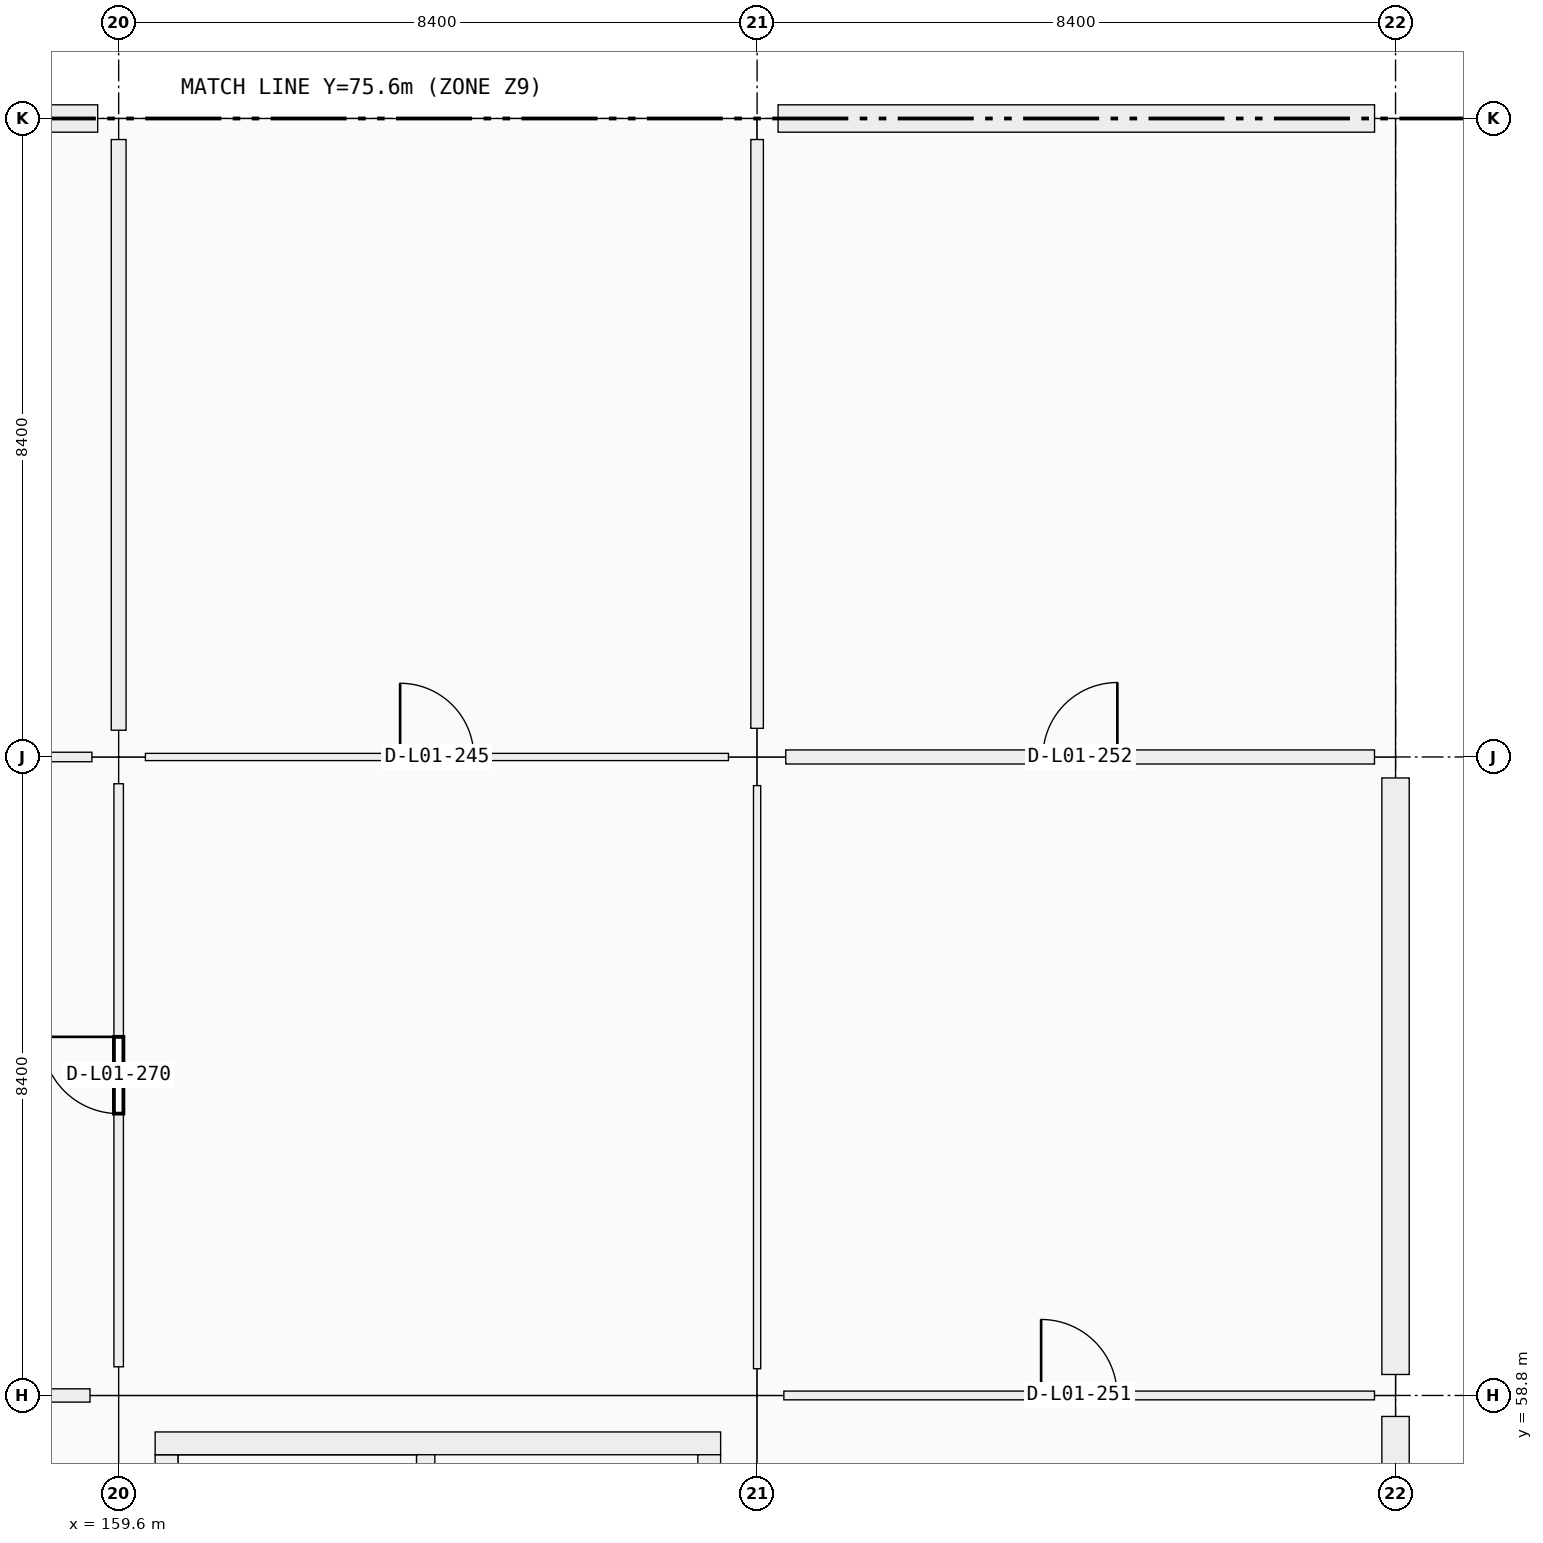
"""IFC4 building model, lengths in metres.
Left out: names, types, materials, properties, quantities, classifications, styles, units other than length and angle.
Written with IfcOpenShell. Run it as: python <this file> out.ifc"""

import sys

from ifc_helpers import new_model, si_unit, direction, frame, frame_2d, origin, origin_2d, place, context, subcontext, project, spatial, rectangle, extrude, element, fill, save


model = new_model("IFC4")
c1 = context("Model", 3, precision=1e-05, world=origin(), true_north=direction((0.0, 1.0)))
c2 = subcontext(c1, "Body", "Model", "MODEL_VIEW")
j1 = project(units=[si_unit("LENGTHUNIT", "METRE"), si_unit("PLANEANGLEUNIT", "RADIAN")], contexts=[c1])
p1 = place(None, origin())
s1 = spatial("IfcSite", under=j1, at=p1, CompositionType="ELEMENT")
p2 = place(p1, origin())
s2 = spatial("IfcBuilding", under=s1, at=p2, CompositionType="ELEMENT")
p3 = place(p2, frame((0.0, 0.0, 5.76)))
s3 = spatial("IfcBuildingStorey", under=s2, at=p3, CompositionType="ELEMENT", Elevation=5.76)
p4 = place(p3, frame((159.6, 58.8, 0.0), z_axis=(0.0, 0.0, 1.0), x_axis=(1.0, 0.0, 0.0)))
e1 = element("IfcColumn", 1, at=p4, inside=s3, PredefinedType="COLUMN", context=c2, shape_type="SweptSolid", body=[
    extrude(rectangle(XDim=0.75, YDim=0.75, at=origin_2d()), origin(), (0.0, 0.0, 1.0), 4.5),
])
p5 = place(p3, frame((159.6, 67.2, 0.0), z_axis=(0.0, 0.0, 1.0), x_axis=(1.0, 0.0, 0.0)))
e2 = element("IfcColumn", 2, at=p5, inside=s3, PredefinedType="COLUMN", context=c2, shape_type="SweptSolid", body=[
    extrude(rectangle(XDim=0.7, YDim=0.7, at=origin_2d()), origin(), (0.0, 0.0, 1.0), 4.5),
])
p6 = place(p3, frame((159.6, 75.6, 0.0), z_axis=(0.0, 0.0, 1.0), x_axis=(1.0, 0.0, 0.0)))
e3 = element("IfcColumn", 3, at=p6, inside=s3, PredefinedType="COLUMN", context=c2, shape_type="SweptSolid", body=[
    extrude(rectangle(XDim=0.55, YDim=0.55, at=origin_2d()), origin(), (0.0, 0.0, 1.0), 4.2),
])
p7 = place(p3, frame((168.0, 58.8, 0.0), z_axis=(0.0, 0.0, 1.0), x_axis=(1.0, 0.0, 0.0)))
e4 = element("IfcColumn", 4, at=p7, inside=s3, PredefinedType="COLUMN", context=c2, shape_type="SweptSolid", body=[
    extrude(rectangle(XDim=0.7, YDim=0.7, at=origin_2d()), origin(), (0.0, 0.0, 1.0), 4.5),
])
p8 = place(p3, frame((168.0, 67.2, 0.0), z_axis=(0.0, 0.0, 1.0), x_axis=(1.0, 0.0, 0.0)))
e5 = element("IfcColumn", 5, at=p8, inside=s3, PredefinedType="COLUMN", context=c2, shape_type="SweptSolid", body=[
    extrude(rectangle(XDim=0.75, YDim=0.75, at=origin_2d()), origin(), (0.0, 0.0, 1.0), 4.5),
])
for number, where, z_axis, x_axis in (
    (6, (168.0, 75.6, 0.0), (0.0, 0.0, 1.0), (1.0, 0.0, 0.0)),
    (7, (176.4, 58.8, 0.0), (0.0, 0.0, 1.0), (1.0, 0.0, 0.0)),
    (8, (176.4, 67.2, 0.0), (0.0, 0.0, 1.0), (1.0, 0.0, 0.0)),
    (9, (176.4, 75.6, 0.0), (0.0, 0.0, 1.0), (1.0, 0.0, 0.0)),
):
    element("IfcColumn", number, at=place(p3, frame(where, z_axis=z_axis, x_axis=x_axis)), inside=s3, PredefinedType="COLUMN", context=c2, shape_type="SweptSolid", body=[
        extrude(rectangle(XDim=0.55, YDim=0.55, at=origin_2d()), origin(), (0.0, 0.0, 1.0), 4.2),
    ])
p9 = place(p3, frame((151.476, 75.6, 0.0), z_axis=(0.0, 0.0, 1.0), x_axis=(1.0, 0.0, 0.0)))
e10 = element("IfcWall", 10, at=p9, inside=s3, PredefinedType="SOLIDWALL", context=c2, shape_type="SweptSolid", body=[
    extrude(rectangle(XDim=7.848, YDim=0.36, at=frame_2d((3.924, 0.0))), origin(), (0.0, 0.0, 1.0), 3.4),
])
p10 = place(p9, frame((2.474, 0.0, 0.9)))
e11 = element("IfcOpeningElement", 11, at=p10, cuts=e10, PredefinedType="OPENING", context=c2, shape_type="SweptSolid", body=[
    extrude(rectangle(XDim=2.9, YDim=1.85, at=frame_2d((1.45, 0.925))), frame((0.0, 0.18, 0.0), z_axis=(0.0, -1.0, 0.0), x_axis=(1.0, 0.0, 0.0)), (0.0, 0.0, 1.0), 0.36),
])
p11 = place(p3, frame((176.4, 58.524, 0.0), z_axis=(0.0, 0.0, 1.0), x_axis=(0.0, -1.0, 0.0)))
e12 = element("IfcWall", 12, at=p11, inside=s3, PredefinedType="SOLIDWALL", context=c2, shape_type="SweptSolid", body=[
    extrude(rectangle(XDim=7.848, YDim=0.36, at=frame_2d((3.924, 0.0))), origin(), (0.0, 0.0, 1.0), 3.4),
])
p12 = place(p11, frame((2.749, 0.0, 0.9)))
e13 = element("IfcOpeningElement", 13, at=p12, cuts=e12, PredefinedType="OPENING", context=c2, shape_type="SweptSolid", body=[
    extrude(rectangle(XDim=2.35, YDim=1.6, at=frame_2d((1.175, 0.8))), frame((0.0, 0.18, 0.0), z_axis=(0.0, -1.0, 0.0), x_axis=(1.0, 0.0, 0.0)), (0.0, 0.0, 1.0), 0.36),
])
p13 = place(p3, frame((176.4, 66.924, 0.0), z_axis=(0.0, 0.0, 1.0), x_axis=(0.0, -1.0, 0.0)))
e14 = element("IfcWall", 14, at=p13, inside=s3, PredefinedType="SOLIDWALL", context=c2, shape_type="SweptSolid", body=[
    extrude(rectangle(XDim=7.848, YDim=0.36, at=frame_2d((3.924, 0.0))), origin(), (0.0, 0.0, 1.0), 3.4),
])
p14 = place(p13, frame((2.549, 0.0, 0.9)))
e15 = element("IfcOpeningElement", 15, at=p14, cuts=e14, PredefinedType="OPENING", context=c2, shape_type="SweptSolid", body=[
    extrude(rectangle(XDim=2.75, YDim=1.6, at=frame_2d((1.375, 0.8))), frame((0.0, 0.18, 0.0), z_axis=(0.0, -1.0, 0.0), x_axis=(1.0, 0.0, 0.0)), (0.0, 0.0, 1.0), 0.36),
])
p15 = place(p3, frame((168.276, 75.6, 0.0), z_axis=(0.0, 0.0, 1.0), x_axis=(1.0, 0.0, 0.0)))
e16 = element("IfcWall", 16, at=p15, inside=s3, PredefinedType="SOLIDWALL", context=c2, shape_type="SweptSolid", body=[
    extrude(rectangle(XDim=7.848, YDim=0.36, at=frame_2d((3.924, 0.0))), origin(), (0.0, 0.0, 1.0), 3.4),
])
p16 = place(p15, frame((3.149, 0.0, 0.9)))
e17 = element("IfcOpeningElement", 17, at=p16, cuts=e16, PredefinedType="OPENING", context=c2, shape_type="SweptSolid", body=[
    extrude(rectangle(XDim=1.55, YDim=1.6, at=frame_2d((0.775, 0.8))), frame((0.0, 0.18, 0.0), z_axis=(0.0, -1.0, 0.0), x_axis=(1.0, 0.0, 0.0)), (0.0, 0.0, 1.0), 0.36),
])
p17 = place(p3, frame((160.23, 51.18, 0.0), z_axis=(0.0, 0.0, 1.0), x_axis=(0.0, 1.0, 0.0)))
e18 = element("IfcWall", 18, at=p17, inside=s3, PredefinedType="SHEAR", context=c2, shape_type="SweptSolid", body=[
    extrude(rectangle(XDim=6.84, YDim=0.3, at=frame_2d((3.42, 0.0))), origin(), (0.0, 0.0, 1.0), 4.5),
])
p18 = place(p3, frame((160.08, 58.17, 0.0), z_axis=(0.0, 0.0, 1.0), x_axis=(1.0, 0.0, 0.0)))
e19 = element("IfcWall", 19, at=p18, inside=s3, PredefinedType="SHEAR", context=c2, shape_type="SweptSolid", body=[
    extrude(rectangle(XDim=7.44, YDim=0.3, at=frame_2d((3.72, 0.0))), origin(), (0.0, 0.0, 1.0), 4.5),
])
p19 = place(p3, frame((167.37, 58.02, 0.0), z_axis=(0.0, 0.0, 1.0), x_axis=(0.0, -1.0, 0.0)))
e20 = element("IfcWall", 20, at=p19, inside=s3, PredefinedType="SHEAR", context=c2, shape_type="SweptSolid", body=[
    extrude(rectangle(XDim=6.84, YDim=0.3, at=frame_2d((3.42, 0.0))), origin(), (0.0, 0.0, 1.0), 4.5),
])
p20 = place(p3, frame((163.64, 51.18, 0.0), z_axis=(0.0, 0.0, 1.0), x_axis=(0.0, 1.0, 0.0)))
e21 = element("IfcWall", 21, at=p20, inside=s3, PredefinedType="SHEAR", context=c2, shape_type="SweptSolid", body=[
    extrude(rectangle(XDim=6.84, YDim=0.24, at=frame_2d((3.42, 0.0))), origin(), (0.0, 0.0, 1.0), 4.5),
])
p21 = place(p20, frame((0.12, 0.0, 0.0)))
e22 = element("IfcOpeningElement", 22, at=p21, cuts=e21, PredefinedType="OPENING", context=c2, shape_type="SweptSolid", body=[
    extrude(rectangle(XDim=1.0, YDim=2.15, at=frame_2d((0.5, 1.075))), frame((0.0, 0.12, 0.0), z_axis=(0.0, -1.0, 0.0), x_axis=(1.0, 0.0, 0.0)), (0.0, 0.0, 1.0), 0.24),
])
p22 = place(p3, frame((151.552, 58.8, 0.0), z_axis=(0.0, 0.0, 1.0), x_axis=(1.0, 0.0, 0.0)))
e23 = element("IfcWall", 23, at=p22, inside=s3, PredefinedType="PARTITIONING", context=c2, shape_type="SweptSolid", body=[
    extrude(rectangle(XDim=7.671, YDim=0.175, at=frame_2d((3.835, 0.0))), origin(), (0.0, 0.0, 1.0), 2.4),
])
p23 = place(p22, frame((3.376, 0.0, 0.0)))
e24 = element("IfcOpeningElement", 24, at=p23, cuts=e23, PredefinedType="OPENING", context=c2, shape_type="SweptSolid", body=[
    extrude(rectangle(XDim=0.92, YDim=2.15, at=frame_2d((0.46, 1.075))), frame((0.0, 0.087, 0.0), z_axis=(0.0, -1.0, 0.0), x_axis=(1.0, 0.0, 0.0)), (0.0, 0.0, 1.0), 0.175),
])
p24 = place(p3, frame((151.577, 67.2, 0.0), z_axis=(0.0, 0.0, 1.0), x_axis=(1.0, 0.0, 0.0)))
e25 = element("IfcWall", 25, at=p24, inside=s3, PredefinedType="PARTITIONING", context=c2, shape_type="SweptSolid", body=[
    extrude(rectangle(XDim=7.671, YDim=0.125, at=frame_2d((3.835, 0.0))), origin(), (0.0, 0.0, 1.0), 2.4),
])
p25 = place(p24, frame((3.311, 0.0, 0.0)))
e26 = element("IfcOpeningElement", 26, at=p25, cuts=e25, PredefinedType="OPENING", context=c2, shape_type="SweptSolid", body=[
    extrude(rectangle(XDim=1.05, YDim=2.12, at=frame_2d((0.525, 1.06))), frame((0.0, 0.062, 0.0), z_axis=(0.0, -1.0, 0.0), x_axis=(1.0, 0.0, 0.0)), (0.0, 0.0, 1.0), 0.125),
])
p26 = place(p3, frame((159.952, 67.2, 0.0), z_axis=(0.0, 0.0, 1.0), x_axis=(1.0, 0.0, 0.0)))
e27 = element("IfcWall", 27, at=p26, inside=s3, PredefinedType="PARTITIONING", context=c2, shape_type="SweptSolid", body=[
    extrude(rectangle(XDim=7.671, YDim=0.095, at=frame_2d((3.835, 0.0))), origin(), (0.0, 0.0, 1.0), 2.4),
])
p27 = place(p26, frame((3.351, 0.0, 0.0)))
e28 = element("IfcOpeningElement", 28, at=p27, cuts=e27, PredefinedType="OPENING", context=c2, shape_type="SweptSolid", body=[
    extrude(rectangle(XDim=0.97, YDim=2.12, at=frame_2d((0.485, 1.06))), frame((0.0, 0.047, 0.0), z_axis=(0.0, -1.0, 0.0), x_axis=(1.0, 0.0, 0.0)), (0.0, 0.0, 1.0), 0.095),
])
p28 = place(p3, frame((168.352, 58.8, 0.0), z_axis=(0.0, 0.0, 1.0), x_axis=(1.0, 0.0, 0.0)))
e29 = element("IfcWall", 29, at=p28, inside=s3, PredefinedType="PARTITIONING", context=c2, shape_type="SweptSolid", body=[
    extrude(rectangle(XDim=7.771, YDim=0.115, at=frame_2d((3.885, 0.0))), origin(), (0.0, 0.0, 1.0), 2.4),
])
p29 = place(p28, frame((3.385, 0.0, 0.0)))
e30 = element("IfcOpeningElement", 30, at=p29, cuts=e29, PredefinedType="OPENING", context=c2, shape_type="SweptSolid", body=[
    extrude(rectangle(XDim=1.0, YDim=2.2, at=frame_2d((0.5, 1.1))), frame((0.0, 0.058, 0.0), z_axis=(0.0, -1.0, 0.0), x_axis=(1.0, 0.0, 0.0)), (0.0, 0.0, 1.0), 0.115),
])
p30 = place(p3, frame((168.377, 67.2, 0.0), z_axis=(0.0, 0.0, 1.0), x_axis=(1.0, 0.0, 0.0)))
e31 = element("IfcWall", 31, at=p30, inside=s3, PredefinedType="PARTITIONING", context=c2, shape_type="SweptSolid", body=[
    extrude(rectangle(XDim=7.746, YDim=0.185, at=frame_2d((3.873, 0.0))), origin(), (0.0, 0.0, 1.0), 2.4),
])
p31 = place(p30, frame((3.383, 0.0, 0.0)))
e32 = element("IfcOpeningElement", 32, at=p31, cuts=e31, PredefinedType="OPENING", context=c2, shape_type="SweptSolid", body=[
    extrude(rectangle(XDim=0.98, YDim=2.18, at=frame_2d((0.49, 1.09))), frame((0.0, 0.093, 0.0), z_axis=(0.0, -1.0, 0.0), x_axis=(1.0, 0.0, 0.0)), (0.0, 0.0, 1.0), 0.185),
])
p32 = place(p3, frame((159.6, 59.177, 0.0), z_axis=(0.0, 0.0, 1.0), x_axis=(0.0, 1.0, 0.0)))
e33 = element("IfcWall", 33, at=p32, inside=s3, PredefinedType="PARTITIONING", context=c2, shape_type="SweptSolid", body=[
    extrude(rectangle(XDim=7.671, YDim=0.125, at=frame_2d((3.835, 0.0))), origin(), (0.0, 0.0, 1.0), 2.4),
])
p33 = place(p32, frame((3.331, 0.0, 0.0)))
e34 = element("IfcOpeningElement", 34, at=p33, cuts=e33, PredefinedType="OPENING", context=c2, shape_type="SweptSolid", body=[
    extrude(rectangle(XDim=1.01, YDim=2.12, at=frame_2d((0.505, 1.06))), frame((0.0, 0.062, 0.0), z_axis=(0.0, -1.0, 0.0), x_axis=(1.0, 0.0, 0.0)), (0.0, 0.0, 1.0), 0.125),
])
p34 = place(p3, frame((159.6, 67.552, 0.0), z_axis=(0.0, 0.0, 1.0), x_axis=(0.0, 1.0, 0.0)))
e35 = element("IfcWall", 35, at=p34, inside=s3, PredefinedType="PARTITIONING", context=c2, shape_type="SweptSolid", body=[
    extrude(rectangle(XDim=7.771, YDim=0.195, at=frame_2d((3.885, 0.0))), origin(), (0.0, 0.0, 1.0), 2.4),
])
p35 = place(p34, frame((3.365, 0.0, 0.0)))
e36 = element("IfcOpeningElement", 36, at=p35, cuts=e35, PredefinedType="OPENING", context=c2, shape_type="SweptSolid", body=[
    extrude(rectangle(XDim=1.04, YDim=2.2, at=frame_2d((0.52, 1.1))), frame((0.0, 0.098, 0.0), z_axis=(0.0, -1.0, 0.0), x_axis=(1.0, 0.0, 0.0)), (0.0, 0.0, 1.0), 0.195),
])
p36 = place(p3, frame((168.0, 59.152, 0.0), z_axis=(0.0, 0.0, 1.0), x_axis=(0.0, 1.0, 0.0)))
e37 = element("IfcWall", 37, at=p36, inside=s3, PredefinedType="PARTITIONING", context=c2, shape_type="SweptSolid", body=[
    extrude(rectangle(XDim=7.671, YDim=0.095, at=frame_2d((3.835, 0.0))), origin(), (0.0, 0.0, 1.0), 2.4),
])
p37 = place(p36, frame((3.365, 0.0, 0.0)))
e38 = element("IfcOpeningElement", 38, at=p37, cuts=e37, PredefinedType="OPENING", context=c2, shape_type="SweptSolid", body=[
    extrude(rectangle(XDim=0.94, YDim=2.15, at=frame_2d((0.47, 1.075))), frame((0.0, 0.047, 0.0), z_axis=(0.0, -1.0, 0.0), x_axis=(1.0, 0.0, 0.0)), (0.0, 0.0, 1.0), 0.095),
])
p38 = place(p3, frame((168.0, 67.577, 0.0), z_axis=(0.0, 0.0, 1.0), x_axis=(0.0, 1.0, 0.0)))
e39 = element("IfcWall", 39, at=p38, inside=s3, PredefinedType="PARTITIONING", context=c2, shape_type="SweptSolid", body=[
    extrude(rectangle(XDim=7.746, YDim=0.165, at=frame_2d((3.873, 0.0))), origin(), (0.0, 0.0, 1.0), 2.4),
])
p39 = place(p38, frame((3.413, 0.0, 0.0)))
e40 = element("IfcOpeningElement", 40, at=p39, cuts=e39, PredefinedType="OPENING", context=c2, shape_type="SweptSolid", body=[
    extrude(rectangle(XDim=0.92, YDim=2.15, at=frame_2d((0.46, 1.075))), frame((0.0, 0.083, 0.0), z_axis=(0.0, -1.0, 0.0), x_axis=(1.0, 0.0, 0.0)), (0.0, 0.0, 1.0), 0.165),
])
p40 = place(p14, origin())
e41 = element("IfcWindow", 41, at=p40, inside=s3, PartitioningType="SINGLE_PANEL", PredefinedType="WINDOW", context=c2, shape_type="SweptSolid", body=[
    extrude(rectangle(XDim=2.75, YDim=1.6, at=frame_2d((1.375, 0.8))), frame((0.0, 0.03, 0.0), z_axis=(0.0, -1.0, 0.0), x_axis=(1.0, 0.0, 0.0)), (0.0, 0.0, 1.0), 0.06),
])
fill(e15, e41)
p41 = place(p16, origin())
e42 = element("IfcWindow", 42, at=p41, inside=s3, PartitioningType="SINGLE_PANEL", PredefinedType="WINDOW", context=c2, shape_type="SweptSolid", body=[
    extrude(rectangle(XDim=1.55, YDim=1.6, at=frame_2d((0.775, 0.8))), frame((0.0, 0.03, 0.0), z_axis=(0.0, -1.0, 0.0), x_axis=(1.0, 0.0, 0.0)), (0.0, 0.0, 1.0), 0.06),
])
fill(e17, e42)
p42 = place(p27, origin())
e43 = element("IfcDoor", 43, at=p42, inside=s3, OperationType="SINGLE_SWING_LEFT", PredefinedType="DOOR", context=c2, shape_type="SweptSolid", body=[
    extrude(rectangle(XDim=0.97, YDim=2.12, at=frame_2d((0.485, 1.06))), frame((0.0, 0.025, 0.0), z_axis=(0.0, -1.0, 0.0), x_axis=(1.0, 0.0, 0.0)), (0.0, 0.0, 1.0), 0.05),
])
fill(e28, e43)
p43 = place(p29, origin())
e44 = element("IfcDoor", 44, at=p43, inside=s3, OperationType="SINGLE_SWING_LEFT", PredefinedType="DOOR", context=c2, shape_type="SweptSolid", body=[
    extrude(rectangle(XDim=1.0, YDim=2.2, at=frame_2d((0.5, 1.1))), frame((0.0, 0.025, 0.0), z_axis=(0.0, -1.0, 0.0), x_axis=(1.0, 0.0, 0.0)), (0.0, 0.0, 1.0), 0.05),
])
fill(e30, e44)
p44 = place(p31, origin())
e45 = element("IfcDoor", 45, at=p44, inside=s3, OperationType="SINGLE_SWING_RIGHT", PredefinedType="DOOR", context=c2, shape_type="SweptSolid", body=[
    extrude(rectangle(XDim=0.98, YDim=2.18, at=frame_2d((0.49, 1.09))), frame((0.0, 0.025, 0.0), z_axis=(0.0, -1.0, 0.0), x_axis=(1.0, 0.0, 0.0)), (0.0, 0.0, 1.0), 0.05),
])
fill(e32, e45)
p45 = place(p33, origin())
e46 = element("IfcDoor", 46, at=p45, inside=s3, OperationType="SINGLE_SWING_RIGHT", PredefinedType="DOOR", context=c2, shape_type="SweptSolid", body=[
    extrude(rectangle(XDim=1.01, YDim=2.12, at=frame_2d((0.505, 1.06))), frame((0.0, 0.025, 0.0), z_axis=(0.0, -1.0, 0.0), x_axis=(1.0, 0.0, 0.0)), (0.0, 0.0, 1.0), 0.05),
])
fill(e34, e46)
p46 = place(p35, origin())
e47 = element("IfcDoor", 47, at=p46, inside=s3, OperationType="SINGLE_SWING_LEFT", PredefinedType="DOOR", context=c2, shape_type="SweptSolid", body=[
    extrude(rectangle(XDim=1.04, YDim=2.2, at=frame_2d((0.52, 1.1))), frame((0.0, 0.025, 0.0), z_axis=(0.0, -1.0, 0.0), x_axis=(1.0, 0.0, 0.0)), (0.0, 0.0, 1.0), 0.05),
])
fill(e36, e47)
p47 = place(p37, origin())
e48 = element("IfcDoor", 48, at=p47, inside=s3, OperationType="SINGLE_SWING_RIGHT", PredefinedType="DOOR", context=c2, shape_type="SweptSolid", body=[
    extrude(rectangle(XDim=0.94, YDim=2.15, at=frame_2d((0.47, 1.075))), frame((0.0, 0.025, 0.0), z_axis=(0.0, -1.0, 0.0), x_axis=(1.0, 0.0, 0.0)), (0.0, 0.0, 1.0), 0.05),
])
fill(e38, e48)
p48 = place(p39, origin())
e49 = element("IfcDoor", 49, at=p48, inside=s3, OperationType="SINGLE_SWING_LEFT", PredefinedType="DOOR", context=c2, shape_type="SweptSolid", body=[
    extrude(rectangle(XDim=0.92, YDim=2.15, at=frame_2d((0.46, 1.075))), frame((0.0, 0.025, 0.0), z_axis=(0.0, -1.0, 0.0), x_axis=(1.0, 0.0, 0.0)), (0.0, 0.0, 1.0), 0.05),
])
fill(e40, e49)
save(model, sys.argv[1])
